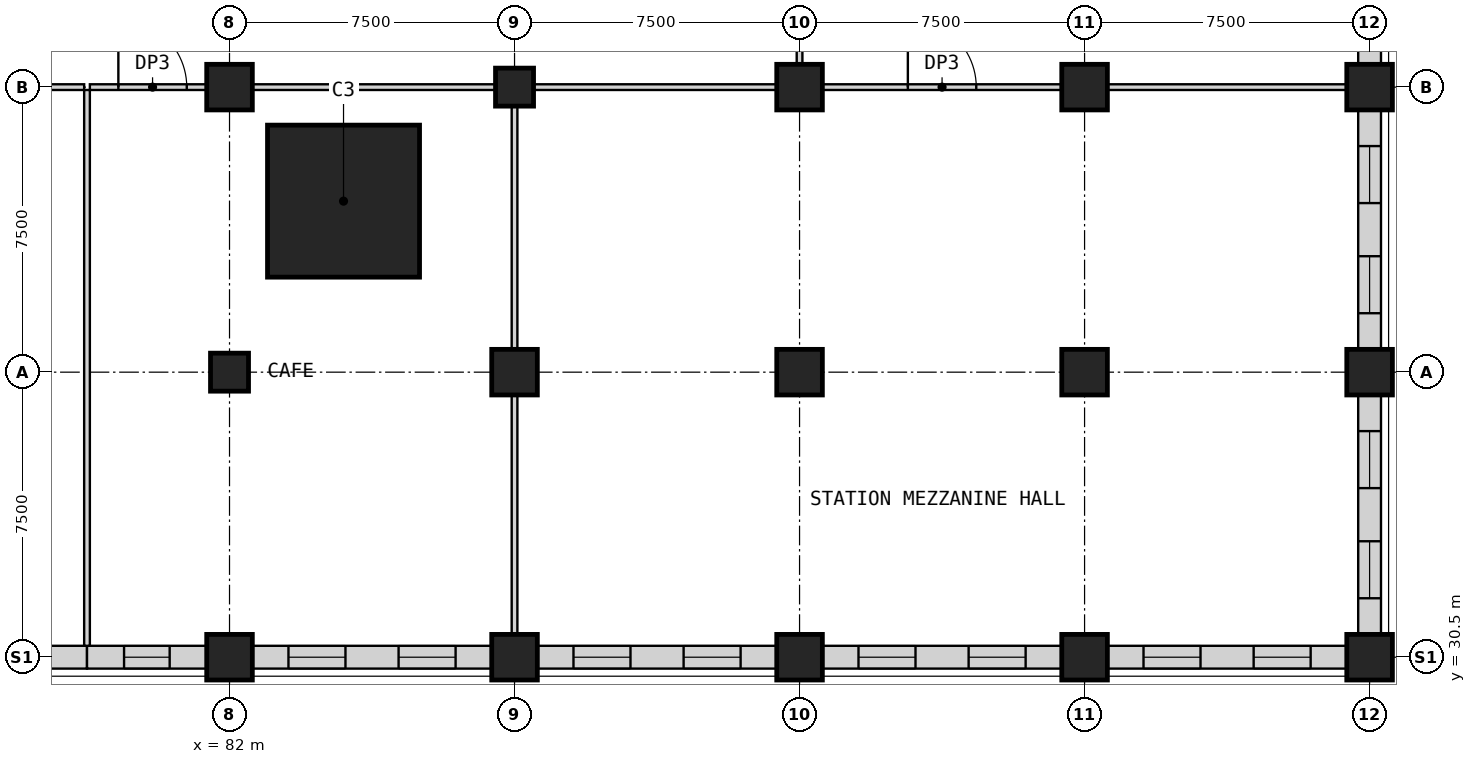
"""IFC4 building model, lengths in metres.
Left out: names, types, materials, properties, quantities, classifications, styles, units other than length and angle.
Written with IfcOpenShell. Run it as: python <this file> out.ifc"""

import sys

from ifc_helpers import new_model, si_unit, direction, frame, frame_2d, origin, origin_2d, place, context, subcontext, project, spatial, rectangle, extrude, element, fill, save


model = new_model("IFC4")
c1 = context("Model", 3, precision=1e-05, world=origin(), true_north=direction((0.0, 1.0)))
c2 = subcontext(c1, "Body", "Model", "MODEL_VIEW")
j1 = project(units=[si_unit("LENGTHUNIT", "METRE"), si_unit("PLANEANGLEUNIT", "RADIAN")], contexts=[c1])
p1 = place(None, origin())
s1 = spatial("IfcSite", under=j1, at=p1, CompositionType="ELEMENT")
p2 = place(p1, origin())
s2 = spatial("IfcBuilding", under=s1, at=p2, CompositionType="ELEMENT")
p3 = place(p2, frame((0.0, 0.0, 8.0)))
s3 = spatial("IfcBuildingStorey", under=s2, at=p3, CompositionType="ELEMENT", Elevation=8.0)
p4 = place(p3, frame((82.0, 38.0, 0.0), z_axis=(0.0, 0.0, 1.0), x_axis=(1.0, 0.0, 0.0)))
e1 = element("IfcColumn", 1, at=p4, inside=s3, PredefinedType="COLUMN", context=c2, shape_type="SweptSolid", body=[
    extrude(rectangle(XDim=1.0, YDim=1.0, at=origin_2d()), origin(), (0.0, 0.0, 1.0), 5.5),
])
p5 = place(p3, frame((82.0, 45.5, 0.0), z_axis=(0.0, 0.0, 1.0), x_axis=(1.0, 0.0, 0.0)))
e2 = element("IfcColumn", 2, at=p5, inside=s3, PredefinedType="COLUMN", context=c2, shape_type="SweptSolid", body=[
    extrude(rectangle(XDim=1.2, YDim=1.2, at=origin_2d()), origin(), (0.0, 0.0, 1.0), 5.5),
])
p6 = place(p3, frame((89.5, 45.5, 0.0), z_axis=(0.0, 0.0, 1.0), x_axis=(1.0, 0.0, 0.0)))
e3 = element("IfcColumn", 3, at=p6, inside=s3, PredefinedType="COLUMN", context=c2, shape_type="SweptSolid", body=[
    extrude(rectangle(XDim=1.0, YDim=1.0, at=origin_2d()), origin(), (0.0, 0.0, 1.0), 5.5),
])
p7 = place(p3, frame((85.0, 42.5, 0.0), z_axis=(0.0, 0.0, 1.0), x_axis=(1.0, 0.0, 0.0)))
e4 = element("IfcColumn", 4, at=p7, inside=s3, PredefinedType="COLUMN", context=c2, shape_type="SweptSolid", body=[
    extrude(rectangle(XDim=4.0, YDim=4.0, at=origin_2d()), origin(), (0.0, 0.0, 1.0), 5.5),
])
for number, where, z_axis, x_axis in (
    (5, (82.0, 30.5, 0.0), (0.0, 0.0, 1.0), (1.0, 0.0, 0.0)),
    (6, (89.5, 30.5, 0.0), (0.0, 0.0, 1.0), (1.0, 0.0, 0.0)),
    (7, (89.5, 38.0, 0.0), (0.0, 0.0, 1.0), (1.0, 0.0, 0.0)),
    (8, (97.0, 30.5, 0.0), (0.0, 0.0, 1.0), (1.0, 0.0, 0.0)),
    (9, (97.0, 38.0, 0.0), (0.0, 0.0, 1.0), (1.0, 0.0, 0.0)),
    (10, (97.0, 45.5, 0.0), (0.0, 0.0, 1.0), (1.0, 0.0, 0.0)),
    (11, (104.5, 30.5, 0.0), (0.0, 0.0, 1.0), (1.0, 0.0, 0.0)),
    (12, (104.5, 38.0, 0.0), (0.0, 0.0, 1.0), (1.0, 0.0, 0.0)),
    (13, (104.5, 45.5, 0.0), (0.0, 0.0, 1.0), (1.0, 0.0, 0.0)),
    (14, (112.0, 30.5, 0.0), (0.0, 0.0, 1.0), (1.0, 0.0, 0.0)),
    (15, (112.0, 38.0, 0.0), (0.0, 0.0, 1.0), (1.0, 0.0, 0.0)),
    (16, (112.0, 45.5, 0.0), (0.0, 0.0, 1.0), (1.0, 0.0, 0.0)),
):
    element("IfcColumn", number, at=place(p3, frame(where, z_axis=z_axis, x_axis=x_axis)), inside=s3, PredefinedType="COLUMN", context=c2, shape_type="SweptSolid", body=[
        extrude(rectangle(XDim=1.2, YDim=1.2, at=origin_2d()), origin(), (0.0, 0.0, 1.0), 5.5),
    ])
p8 = place(p3, frame((75.1, 30.5, 0.0), z_axis=(0.0, 0.0, 1.0), x_axis=(1.0, 0.0, 0.0)))
e17 = element("IfcWall", 17, at=p8, inside=s3, PredefinedType="PARTITIONING", context=c2, shape_type="SweptSolid", body=[
    extrude(rectangle(XDim=3.15, YDim=0.6, at=frame_2d((1.575, 0.0))), origin(), (0.0, 0.0, 1.0), 4.6),
])
p9 = place(p8, frame((0.975, 0.0, 0.9)))
e18 = element("IfcOpeningElement", 18, at=p9, cuts=e17, PredefinedType="OPENING", context=c2, shape_type="SweptSolid", body=[
    extrude(rectangle(XDim=1.2, YDim=2.8, at=frame_2d((0.6, 1.4))), frame((0.0, 0.31, 0.0), z_axis=(0.0, -1.0, 0.0), x_axis=(1.0, 0.0, 0.0)), (0.0, 0.0, 1.0), 0.62),
])
p10 = place(p3, frame((78.25, 30.5, 0.0), z_axis=(0.0, 0.0, 1.0), x_axis=(1.0, 0.0, 0.0)))
e19 = element("IfcWall", 19, at=p10, inside=s3, PredefinedType="PARTITIONING", context=c2, shape_type="SweptSolid", body=[
    extrude(rectangle(XDim=3.15, YDim=0.6, at=frame_2d((1.575, 0.0))), origin(), (0.0, 0.0, 1.0), 4.6),
])
p11 = place(p10, frame((0.975, 0.0, 0.9)))
e20 = element("IfcOpeningElement", 20, at=p11, cuts=e19, PredefinedType="OPENING", context=c2, shape_type="SweptSolid", body=[
    extrude(rectangle(XDim=1.2, YDim=2.8, at=frame_2d((0.6, 1.4))), frame((0.0, 0.31, 0.0), z_axis=(0.0, -1.0, 0.0), x_axis=(1.0, 0.0, 0.0)), (0.0, 0.0, 1.0), 0.62),
])
p12 = place(p3, frame((82.6, 30.5, 0.0), z_axis=(0.0, 0.0, 1.0), x_axis=(1.0, 0.0, 0.0)))
e21 = element("IfcWall", 21, at=p12, inside=s3, PredefinedType="PARTITIONING", context=c2, shape_type="SweptSolid", body=[
    extrude(rectangle(XDim=6.3, YDim=0.6, at=frame_2d((3.15, 0.0))), origin(), (0.0, 0.0, 1.0), 4.6),
])
p13 = place(p12, frame((0.951, 0.0, 0.9)))
e22 = element("IfcOpeningElement", 22, at=p13, cuts=e21, PredefinedType="OPENING", context=c2, shape_type="SweptSolid", body=[
    extrude(rectangle(XDim=1.5, YDim=2.8, at=frame_2d((0.75, 1.4))), frame((0.0, 0.31, 0.0), z_axis=(0.0, -1.0, 0.0), x_axis=(1.0, 0.0, 0.0)), (0.0, 0.0, 1.0), 0.62),
])
p14 = place(p12, frame((3.849, 0.0, 0.9)))
e23 = element("IfcOpeningElement", 23, at=p14, cuts=e21, PredefinedType="OPENING", context=c2, shape_type="SweptSolid", body=[
    extrude(rectangle(XDim=1.5, YDim=2.8, at=frame_2d((0.75, 1.4))), frame((0.0, 0.31, 0.0), z_axis=(0.0, -1.0, 0.0), x_axis=(1.0, 0.0, 0.0)), (0.0, 0.0, 1.0), 0.62),
])
p15 = place(p3, frame((90.1, 30.5, 0.0), z_axis=(0.0, 0.0, 1.0), x_axis=(1.0, 0.0, 0.0)))
e24 = element("IfcWall", 24, at=p15, inside=s3, PredefinedType="PARTITIONING", context=c2, shape_type="SweptSolid", body=[
    extrude(rectangle(XDim=6.3, YDim=0.6, at=frame_2d((3.15, 0.0))), origin(), (0.0, 0.0, 1.0), 4.6),
])
p16 = place(p15, frame((0.951, 0.0, 0.9)))
e25 = element("IfcOpeningElement", 25, at=p16, cuts=e24, PredefinedType="OPENING", context=c2, shape_type="SweptSolid", body=[
    extrude(rectangle(XDim=1.5, YDim=2.8, at=frame_2d((0.75, 1.4))), frame((0.0, 0.31, 0.0), z_axis=(0.0, -1.0, 0.0), x_axis=(1.0, 0.0, 0.0)), (0.0, 0.0, 1.0), 0.62),
])
p17 = place(p15, frame((3.849, 0.0, 0.9)))
e26 = element("IfcOpeningElement", 26, at=p17, cuts=e24, PredefinedType="OPENING", context=c2, shape_type="SweptSolid", body=[
    extrude(rectangle(XDim=1.5, YDim=2.8, at=frame_2d((0.75, 1.4))), frame((0.0, 0.31, 0.0), z_axis=(0.0, -1.0, 0.0), x_axis=(1.0, 0.0, 0.0)), (0.0, 0.0, 1.0), 0.62),
])
p18 = place(p3, frame((97.6, 30.5, 0.0), z_axis=(0.0, 0.0, 1.0), x_axis=(1.0, 0.0, 0.0)))
e27 = element("IfcWall", 27, at=p18, inside=s3, PredefinedType="PARTITIONING", context=c2, shape_type="SweptSolid", body=[
    extrude(rectangle(XDim=6.3, YDim=0.6, at=frame_2d((3.15, 0.0))), origin(), (0.0, 0.0, 1.0), 4.6),
])
p19 = place(p18, frame((0.951, 0.0, 0.9)))
e28 = element("IfcOpeningElement", 28, at=p19, cuts=e27, PredefinedType="OPENING", context=c2, shape_type="SweptSolid", body=[
    extrude(rectangle(XDim=1.5, YDim=2.8, at=frame_2d((0.75, 1.4))), frame((0.0, 0.31, 0.0), z_axis=(0.0, -1.0, 0.0), x_axis=(1.0, 0.0, 0.0)), (0.0, 0.0, 1.0), 0.62),
])
p20 = place(p18, frame((3.849, 0.0, 0.9)))
e29 = element("IfcOpeningElement", 29, at=p20, cuts=e27, PredefinedType="OPENING", context=c2, shape_type="SweptSolid", body=[
    extrude(rectangle(XDim=1.5, YDim=2.8, at=frame_2d((0.75, 1.4))), frame((0.0, 0.31, 0.0), z_axis=(0.0, -1.0, 0.0), x_axis=(1.0, 0.0, 0.0)), (0.0, 0.0, 1.0), 0.62),
])
p21 = place(p3, frame((105.1, 30.5, 0.0), z_axis=(0.0, 0.0, 1.0), x_axis=(1.0, 0.0, 0.0)))
e30 = element("IfcWall", 30, at=p21, inside=s3, PredefinedType="PARTITIONING", context=c2, shape_type="SweptSolid", body=[
    extrude(rectangle(XDim=6.3, YDim=0.6, at=frame_2d((3.15, 0.0))), origin(), (0.0, 0.0, 1.0), 4.6),
])
p22 = place(p21, frame((0.951, 0.0, 0.9)))
e31 = element("IfcOpeningElement", 31, at=p22, cuts=e30, PredefinedType="OPENING", context=c2, shape_type="SweptSolid", body=[
    extrude(rectangle(XDim=1.5, YDim=2.8, at=frame_2d((0.75, 1.4))), frame((0.0, 0.31, 0.0), z_axis=(0.0, -1.0, 0.0), x_axis=(1.0, 0.0, 0.0)), (0.0, 0.0, 1.0), 0.62),
])
p23 = place(p21, frame((3.849, 0.0, 0.9)))
e32 = element("IfcOpeningElement", 32, at=p23, cuts=e30, PredefinedType="OPENING", context=c2, shape_type="SweptSolid", body=[
    extrude(rectangle(XDim=1.5, YDim=2.8, at=frame_2d((0.75, 1.4))), frame((0.0, 0.31, 0.0), z_axis=(0.0, -1.0, 0.0), x_axis=(1.0, 0.0, 0.0)), (0.0, 0.0, 1.0), 0.62),
])
p24 = place(p3, frame((75.1, 45.5, 0.0), z_axis=(0.0, 0.0, 1.0), x_axis=(1.0, 0.0, 0.0)))
e33 = element("IfcWall", 33, at=p24, inside=s3, PredefinedType="PARTITIONING", context=c2, shape_type="SweptSolid", body=[
    extrude(rectangle(XDim=3.075, YDim=0.15, at=frame_2d((1.538, 0.0))), origin(), (0.0, 0.0, 1.0), 5.2),
])
p25 = place(p3, frame((78.325, 45.5, 0.0), z_axis=(0.0, 0.0, 1.0), x_axis=(1.0, 0.0, 0.0)))
e34 = element("IfcWall", 34, at=p25, inside=s3, PredefinedType="PARTITIONING", context=c2, shape_type="SweptSolid", body=[
    extrude(rectangle(XDim=3.075, YDim=0.15, at=frame_2d((1.538, 0.0))), origin(), (0.0, 0.0, 1.0), 5.2),
])
p26 = place(p25, frame((0.75, 0.0, 0.0)))
e35 = element("IfcOpeningElement", 35, at=p26, cuts=e34, PredefinedType="OPENING", context=c2, shape_type="SweptSolid", body=[
    extrude(rectangle(XDim=1.8, YDim=2.4, at=frame_2d((0.9, 1.2))), frame((0.0, 0.085, 0.0), z_axis=(0.0, -1.0, 0.0), x_axis=(1.0, 0.0, 0.0)), (0.0, 0.0, 1.0), 0.17),
])
for number, where, z_axis, x_axis in (
    (36, (82.6, 45.5, 0.0), (0.0, 0.0, 1.0), (1.0, 0.0, 0.0)),
    (37, (90.0, 45.5, 0.0), (0.0, 0.0, 1.0), (1.0, 0.0, 0.0)),
):
    element("IfcWall", number, at=place(p3, frame(where, z_axis=z_axis, x_axis=x_axis)), inside=s3, PredefinedType="PARTITIONING", context=c2, shape_type="SweptSolid", body=[
        extrude(rectangle(XDim=6.4, YDim=0.15, at=frame_2d((3.2, 0.0))), origin(), (0.0, 0.0, 1.0), 5.2),
    ])
p27 = place(p3, frame((97.6, 45.5, 0.0), z_axis=(0.0, 0.0, 1.0), x_axis=(1.0, 0.0, 0.0)))
e38 = element("IfcWall", 38, at=p27, inside=s3, PredefinedType="PARTITIONING", context=c2, shape_type="SweptSolid", body=[
    extrude(rectangle(XDim=6.3, YDim=0.15, at=frame_2d((3.15, 0.0))), origin(), (0.0, 0.0, 1.0), 5.2),
])
p28 = place(p27, frame((2.25, 0.0, 0.0)))
e39 = element("IfcOpeningElement", 39, at=p28, cuts=e38, PredefinedType="OPENING", context=c2, shape_type="SweptSolid", body=[
    extrude(rectangle(XDim=1.8, YDim=2.4, at=frame_2d((0.9, 1.2))), frame((0.0, 0.085, 0.0), z_axis=(0.0, -1.0, 0.0), x_axis=(1.0, 0.0, 0.0)), (0.0, 0.0, 1.0), 0.17),
])
p29 = place(p3, frame((105.1, 45.5, 0.0), z_axis=(0.0, 0.0, 1.0), x_axis=(1.0, 0.0, 0.0)))
e40 = element("IfcWall", 40, at=p29, inside=s3, PredefinedType="PARTITIONING", context=c2, shape_type="SweptSolid", body=[
    extrude(rectangle(XDim=6.3, YDim=0.15, at=frame_2d((3.15, 0.0))), origin(), (0.0, 0.0, 1.0), 5.2),
])
p30 = place(p3, frame((97.0, 46.1, 0.0), z_axis=(0.0, 0.0, 1.0), x_axis=(0.0, 1.0, 0.0)))
e41 = element("IfcWall", 41, at=p30, inside=s3, PredefinedType="PARTITIONING", context=c2, shape_type="SweptSolid", body=[
    extrude(rectangle(XDim=5.8, YDim=0.15, at=frame_2d((2.9, 0.0))), origin(), (0.0, 0.0, 1.0), 5.2),
])
p31 = place(p30, frame((2.5, 0.0, 0.0)))
e42 = element("IfcOpeningElement", 42, at=p31, cuts=e41, PredefinedType="OPENING", context=c2, shape_type="SweptSolid", body=[
    extrude(rectangle(XDim=1.0, YDim=2.1, at=frame_2d((0.5, 1.05))), frame((0.0, 0.085, 0.0), z_axis=(0.0, -1.0, 0.0), x_axis=(1.0, 0.0, 0.0)), (0.0, 0.0, 1.0), 0.17),
])
p32 = place(p3, frame((112.0, 31.1, 0.0), z_axis=(0.0, 0.0, 1.0), x_axis=(0.0, 1.0, 0.0)))
e43 = element("IfcWall", 43, at=p32, inside=s3, PredefinedType="PARTITIONING", context=c2, shape_type="SweptSolid", body=[
    extrude(rectangle(XDim=6.3, YDim=0.6, at=frame_2d((3.15, 0.0))), origin(), (0.0, 0.0, 1.0), 4.6),
])
p33 = place(p32, frame((0.951, 0.0, 0.9)))
e44 = element("IfcOpeningElement", 44, at=p33, cuts=e43, PredefinedType="OPENING", context=c2, shape_type="SweptSolid", body=[
    extrude(rectangle(XDim=1.5, YDim=2.8, at=frame_2d((0.75, 1.4))), frame((0.0, 0.31, 0.0), z_axis=(0.0, -1.0, 0.0), x_axis=(1.0, 0.0, 0.0)), (0.0, 0.0, 1.0), 0.62),
])
p34 = place(p32, frame((3.849, 0.0, 0.9)))
e45 = element("IfcOpeningElement", 45, at=p34, cuts=e43, PredefinedType="OPENING", context=c2, shape_type="SweptSolid", body=[
    extrude(rectangle(XDim=1.5, YDim=2.8, at=frame_2d((0.75, 1.4))), frame((0.0, 0.31, 0.0), z_axis=(0.0, -1.0, 0.0), x_axis=(1.0, 0.0, 0.0)), (0.0, 0.0, 1.0), 0.62),
])
p35 = place(p3, frame((112.0, 38.6, 0.0), z_axis=(0.0, 0.0, 1.0), x_axis=(0.0, 1.0, 0.0)))
e46 = element("IfcWall", 46, at=p35, inside=s3, PredefinedType="PARTITIONING", context=c2, shape_type="SweptSolid", body=[
    extrude(rectangle(XDim=6.3, YDim=0.6, at=frame_2d((3.15, 0.0))), origin(), (0.0, 0.0, 1.0), 4.6),
])
p36 = place(p35, frame((0.951, 0.0, 0.9)))
e47 = element("IfcOpeningElement", 47, at=p36, cuts=e46, PredefinedType="OPENING", context=c2, shape_type="SweptSolid", body=[
    extrude(rectangle(XDim=1.5, YDim=2.8, at=frame_2d((0.75, 1.4))), frame((0.0, 0.31, 0.0), z_axis=(0.0, -1.0, 0.0), x_axis=(1.0, 0.0, 0.0)), (0.0, 0.0, 1.0), 0.62),
])
p37 = place(p35, frame((3.849, 0.0, 0.9)))
e48 = element("IfcOpeningElement", 48, at=p37, cuts=e46, PredefinedType="OPENING", context=c2, shape_type="SweptSolid", body=[
    extrude(rectangle(XDim=1.5, YDim=2.8, at=frame_2d((0.75, 1.4))), frame((0.0, 0.31, 0.0), z_axis=(0.0, -1.0, 0.0), x_axis=(1.0, 0.0, 0.0)), (0.0, 0.0, 1.0), 0.62),
])
p38 = place(p3, frame((112.0, 46.1, 0.0), z_axis=(0.0, 0.0, 1.0), x_axis=(0.0, 1.0, 0.0)))
e49 = element("IfcWall", 49, at=p38, inside=s3, PredefinedType="PARTITIONING", context=c2, shape_type="SweptSolid", body=[
    extrude(rectangle(XDim=5.8, YDim=0.6, at=frame_2d((2.9, 0.0))), origin(), (0.0, 0.0, 1.0), 4.6),
])
p39 = place(p38, frame((0.816, 0.0, 0.9)))
e50 = element("IfcOpeningElement", 50, at=p39, cuts=e49, PredefinedType="OPENING", context=c2, shape_type="SweptSolid", body=[
    extrude(rectangle(XDim=1.5, YDim=2.8, at=frame_2d((0.75, 1.4))), frame((0.0, 0.31, 0.0), z_axis=(0.0, -1.0, 0.0), x_axis=(1.0, 0.0, 0.0)), (0.0, 0.0, 1.0), 0.62),
])
p40 = place(p38, frame((3.484, 0.0, 0.9)))
e51 = element("IfcOpeningElement", 51, at=p40, cuts=e49, PredefinedType="OPENING", context=c2, shape_type="SweptSolid", body=[
    extrude(rectangle(XDim=1.5, YDim=2.8, at=frame_2d((0.75, 1.4))), frame((0.0, 0.31, 0.0), z_axis=(0.0, -1.0, 0.0), x_axis=(1.0, 0.0, 0.0)), (0.0, 0.0, 1.0), 0.62),
])
p41 = place(p3, frame((78.25, 30.8, 0.0), z_axis=(0.0, 0.0, 1.0), x_axis=(0.0, 1.0, 0.0)))
e52 = element("IfcWall", 52, at=p41, inside=s3, PredefinedType="PARTITIONING", context=c2, shape_type="SweptSolid", body=[
    extrude(rectangle(XDim=14.625, YDim=0.15, at=frame_2d((7.312, 0.0))), origin(), (0.0, 0.0, 1.0), 5.2),
])
p42 = place(p3, frame((89.5, 31.1, 0.0), z_axis=(0.0, 0.0, 1.0), x_axis=(0.0, 1.0, 0.0)))
e53 = element("IfcWall", 53, at=p42, inside=s3, PredefinedType="PARTITIONING", context=c2, shape_type="SweptSolid", body=[
    extrude(rectangle(XDim=6.3, YDim=0.15, at=frame_2d((3.15, 0.0))), origin(), (0.0, 0.0, 1.0), 5.2),
])
p43 = place(p3, frame((89.5, 38.6, 0.0), z_axis=(0.0, 0.0, 1.0), x_axis=(0.0, 1.0, 0.0)))
e54 = element("IfcWall", 54, at=p43, inside=s3, PredefinedType="PARTITIONING", context=c2, shape_type="SweptSolid", body=[
    extrude(rectangle(XDim=6.4, YDim=0.15, at=frame_2d((3.2, 0.0))), origin(), (0.0, 0.0, 1.0), 5.2),
])
p44 = place(p11, origin())
e55 = element("IfcWindow", 55, at=p44, inside=s3, PartitioningType="SINGLE_PANEL", PredefinedType="WINDOW", context=c2, shape_type="SweptSolid", body=[
    extrude(rectangle(XDim=1.2, YDim=2.8, at=frame_2d((0.6, 1.4))), frame((0.0, 0.03, 0.0), z_axis=(0.0, -1.0, 0.0), x_axis=(1.0, 0.0, 0.0)), (0.0, 0.0, 1.0), 0.06),
])
fill(e20, e55)
p45 = place(p13, origin())
e56 = element("IfcWindow", 56, at=p45, inside=s3, PartitioningType="SINGLE_PANEL", PredefinedType="WINDOW", context=c2, shape_type="SweptSolid", body=[
    extrude(rectangle(XDim=1.5, YDim=2.8, at=frame_2d((0.75, 1.4))), frame((0.0, 0.03, 0.0), z_axis=(0.0, -1.0, 0.0), x_axis=(1.0, 0.0, 0.0)), (0.0, 0.0, 1.0), 0.06),
])
fill(e22, e56)
p46 = place(p14, origin())
e57 = element("IfcWindow", 57, at=p46, inside=s3, PartitioningType="SINGLE_PANEL", PredefinedType="WINDOW", context=c2, shape_type="SweptSolid", body=[
    extrude(rectangle(XDim=1.5, YDim=2.8, at=frame_2d((0.75, 1.4))), frame((0.0, 0.03, 0.0), z_axis=(0.0, -1.0, 0.0), x_axis=(1.0, 0.0, 0.0)), (0.0, 0.0, 1.0), 0.06),
])
fill(e23, e57)
p47 = place(p16, origin())
e58 = element("IfcWindow", 58, at=p47, inside=s3, PartitioningType="SINGLE_PANEL", PredefinedType="WINDOW", context=c2, shape_type="SweptSolid", body=[
    extrude(rectangle(XDim=1.5, YDim=2.8, at=frame_2d((0.75, 1.4))), frame((0.0, 0.03, 0.0), z_axis=(0.0, -1.0, 0.0), x_axis=(1.0, 0.0, 0.0)), (0.0, 0.0, 1.0), 0.06),
])
fill(e25, e58)
p48 = place(p17, origin())
e59 = element("IfcWindow", 59, at=p48, inside=s3, PartitioningType="SINGLE_PANEL", PredefinedType="WINDOW", context=c2, shape_type="SweptSolid", body=[
    extrude(rectangle(XDim=1.5, YDim=2.8, at=frame_2d((0.75, 1.4))), frame((0.0, 0.03, 0.0), z_axis=(0.0, -1.0, 0.0), x_axis=(1.0, 0.0, 0.0)), (0.0, 0.0, 1.0), 0.06),
])
fill(e26, e59)
p49 = place(p19, origin())
e60 = element("IfcWindow", 60, at=p49, inside=s3, PartitioningType="SINGLE_PANEL", PredefinedType="WINDOW", context=c2, shape_type="SweptSolid", body=[
    extrude(rectangle(XDim=1.5, YDim=2.8, at=frame_2d((0.75, 1.4))), frame((0.0, 0.03, 0.0), z_axis=(0.0, -1.0, 0.0), x_axis=(1.0, 0.0, 0.0)), (0.0, 0.0, 1.0), 0.06),
])
fill(e28, e60)
p50 = place(p20, origin())
e61 = element("IfcWindow", 61, at=p50, inside=s3, PartitioningType="SINGLE_PANEL", PredefinedType="WINDOW", context=c2, shape_type="SweptSolid", body=[
    extrude(rectangle(XDim=1.5, YDim=2.8, at=frame_2d((0.75, 1.4))), frame((0.0, 0.03, 0.0), z_axis=(0.0, -1.0, 0.0), x_axis=(1.0, 0.0, 0.0)), (0.0, 0.0, 1.0), 0.06),
])
fill(e29, e61)
p51 = place(p22, origin())
e62 = element("IfcWindow", 62, at=p51, inside=s3, PartitioningType="SINGLE_PANEL", PredefinedType="WINDOW", context=c2, shape_type="SweptSolid", body=[
    extrude(rectangle(XDim=1.5, YDim=2.8, at=frame_2d((0.75, 1.4))), frame((0.0, 0.03, 0.0), z_axis=(0.0, -1.0, 0.0), x_axis=(1.0, 0.0, 0.0)), (0.0, 0.0, 1.0), 0.06),
])
fill(e31, e62)
p52 = place(p23, origin())
e63 = element("IfcWindow", 63, at=p52, inside=s3, PartitioningType="SINGLE_PANEL", PredefinedType="WINDOW", context=c2, shape_type="SweptSolid", body=[
    extrude(rectangle(XDim=1.5, YDim=2.8, at=frame_2d((0.75, 1.4))), frame((0.0, 0.03, 0.0), z_axis=(0.0, -1.0, 0.0), x_axis=(1.0, 0.0, 0.0)), (0.0, 0.0, 1.0), 0.06),
])
fill(e32, e63)
p53 = place(p26, origin())
e64 = element("IfcDoor", 64, at=p53, inside=s3, OperationType="SINGLE_SWING_LEFT", PredefinedType="DOOR", context=c2, shape_type="SweptSolid", body=[
    extrude(rectangle(XDim=1.8, YDim=2.4, at=frame_2d((0.9, 1.2))), frame((0.0, 0.025, 0.0), z_axis=(0.0, -1.0, 0.0), x_axis=(1.0, 0.0, 0.0)), (0.0, 0.0, 1.0), 0.05),
])
fill(e35, e64)
p54 = place(p28, origin())
e65 = element("IfcDoor", 65, at=p54, inside=s3, OperationType="SINGLE_SWING_LEFT", PredefinedType="DOOR", context=c2, shape_type="SweptSolid", body=[
    extrude(rectangle(XDim=1.8, YDim=2.4, at=frame_2d((0.9, 1.2))), frame((0.0, 0.025, 0.0), z_axis=(0.0, -1.0, 0.0), x_axis=(1.0, 0.0, 0.0)), (0.0, 0.0, 1.0), 0.05),
])
fill(e39, e65)
p55 = place(p33, origin())
e66 = element("IfcWindow", 66, at=p55, inside=s3, PartitioningType="SINGLE_PANEL", PredefinedType="WINDOW", context=c2, shape_type="SweptSolid", body=[
    extrude(rectangle(XDim=1.5, YDim=2.8, at=frame_2d((0.75, 1.4))), frame((0.0, 0.03, 0.0), z_axis=(0.0, -1.0, 0.0), x_axis=(1.0, 0.0, 0.0)), (0.0, 0.0, 1.0), 0.06),
])
fill(e44, e66)
p56 = place(p34, origin())
e67 = element("IfcWindow", 67, at=p56, inside=s3, PartitioningType="SINGLE_PANEL", PredefinedType="WINDOW", context=c2, shape_type="SweptSolid", body=[
    extrude(rectangle(XDim=1.5, YDim=2.8, at=frame_2d((0.75, 1.4))), frame((0.0, 0.03, 0.0), z_axis=(0.0, -1.0, 0.0), x_axis=(1.0, 0.0, 0.0)), (0.0, 0.0, 1.0), 0.06),
])
fill(e45, e67)
p57 = place(p36, origin())
e68 = element("IfcWindow", 68, at=p57, inside=s3, PartitioningType="SINGLE_PANEL", PredefinedType="WINDOW", context=c2, shape_type="SweptSolid", body=[
    extrude(rectangle(XDim=1.5, YDim=2.8, at=frame_2d((0.75, 1.4))), frame((0.0, 0.03, 0.0), z_axis=(0.0, -1.0, 0.0), x_axis=(1.0, 0.0, 0.0)), (0.0, 0.0, 1.0), 0.06),
])
fill(e47, e68)
p58 = place(p37, origin())
e69 = element("IfcWindow", 69, at=p58, inside=s3, PartitioningType="SINGLE_PANEL", PredefinedType="WINDOW", context=c2, shape_type="SweptSolid", body=[
    extrude(rectangle(XDim=1.5, YDim=2.8, at=frame_2d((0.75, 1.4))), frame((0.0, 0.03, 0.0), z_axis=(0.0, -1.0, 0.0), x_axis=(1.0, 0.0, 0.0)), (0.0, 0.0, 1.0), 0.06),
])
fill(e48, e69)
save(model, sys.argv[1])
